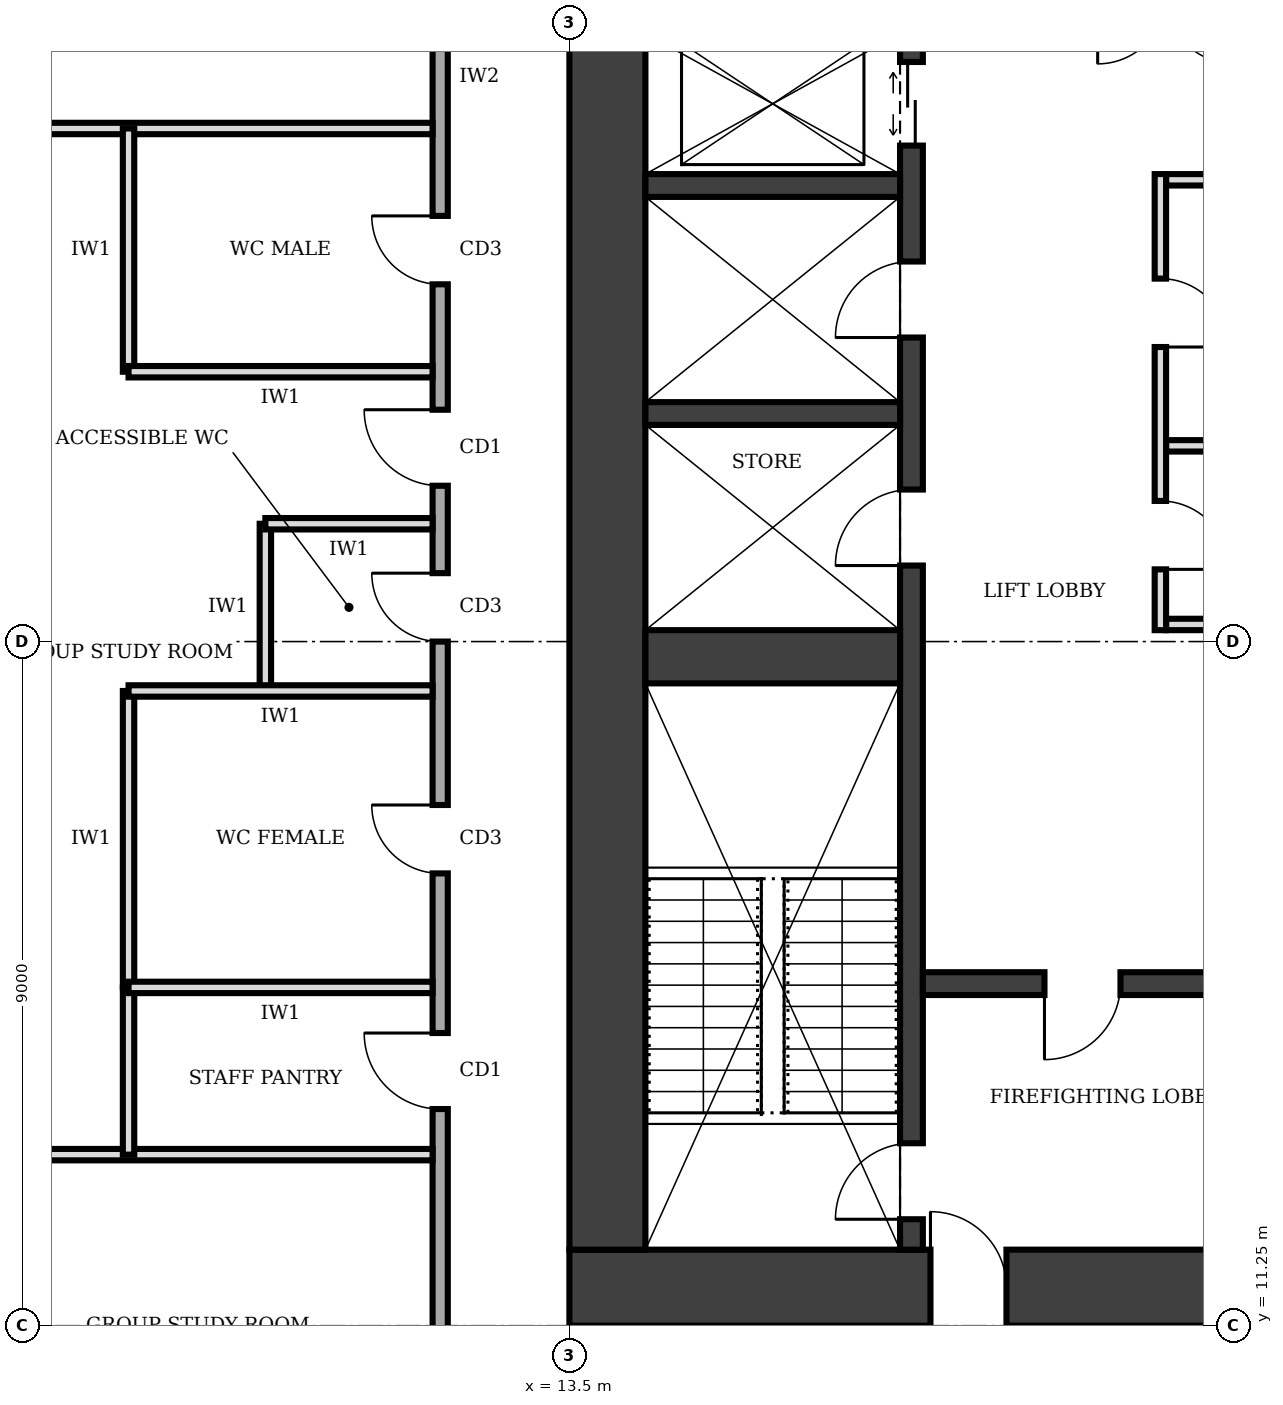
"""IFC4 building model, lengths in metres.
Left out: names, types, materials, properties, quantities, classifications, styles, units other than length and angle.
Written with IfcOpenShell. Run it as: python <this file> out.ifc"""

import sys

from ifc_helpers import new_model, si_unit, direction, frame, frame_2d, origin, place, context, subcontext, project, spatial, rectangle, extrude, element, fill, save


model = new_model("IFC4")
c1 = context("Model", 3, precision=1e-05, world=origin(), true_north=direction((0.0, 1.0)))
c2 = subcontext(c1, "Body", "Model", "MODEL_VIEW")
j1 = project(units=[si_unit("LENGTHUNIT", "METRE"), si_unit("PLANEANGLEUNIT", "RADIAN")], contexts=[c1])
p1 = place(None, origin())
s1 = spatial("IfcSite", under=j1, at=p1, CompositionType="ELEMENT")
p2 = place(p1, origin())
s2 = spatial("IfcBuilding", under=s1, at=p2, CompositionType="ELEMENT")
p3 = place(p2, frame((0.0, 0.0, 197.0)))
s3 = spatial("IfcBuildingStorey", under=s2, at=p3, CompositionType="ELEMENT", Elevation=197.0)
p4 = place(p3, frame((13.5, 11.75, 0.0), z_axis=(0.0, 0.0, 1.0), x_axis=(1.0, 0.0, 0.0)))
e1 = element("IfcWall", 1, at=p4, inside=s3, PredefinedType="SHEAR", context=c2, shape_type="SweptSolid", body=[
    extrude(rectangle(XDim=13.5, YDim=1.0, at=frame_2d((6.75, 0.0))), origin(), (0.0, 0.0, 1.0), 4.0),
])
p5 = place(p4, frame((4.75, 0.0, 0.0)))
e2 = element("IfcOpeningElement", 2, at=p5, cuts=e1, PredefinedType="OPENING", context=c2, shape_type="SweptSolid", body=[
    extrude(rectangle(XDim=1.0, YDim=2.1, at=frame_2d((0.5, 1.05))), frame((0.0, 0.51, 0.0), z_axis=(0.0, -1.0, 0.0), x_axis=(1.0, 0.0, 0.0)), (0.0, 0.0, 1.0), 1.02),
])
p6 = place(p3, frame((14.0, 28.25, 0.0), z_axis=(0.0, 0.0, 1.0), x_axis=(0.0, -1.0, 0.0)))
e3 = element("IfcWall", 3, at=p6, inside=s3, PredefinedType="SHEAR", context=c2, shape_type="SweptSolid", body=[
    extrude(rectangle(XDim=16.0, YDim=1.0, at=frame_2d((8.0, 0.0))), origin(), (0.0, 0.0, 1.0), 4.0),
])
p7 = place(p3, frame((18.0, 12.25, 0.0), z_axis=(0.0, 0.0, 1.0), x_axis=(0.0, 1.0, 0.0)))
e4 = element("IfcWall", 4, at=p7, inside=s3, PredefinedType="SHEAR", context=c2, shape_type="SweptSolid", body=[
    extrude(rectangle(XDim=16.0, YDim=0.3, at=frame_2d((8.0, 0.0))), origin(), (0.0, 0.0, 1.0), 4.0),
])
p8 = place(p7, frame((0.4, 0.0, 0.0)))
e5 = element("IfcOpeningElement", 5, at=p8, cuts=e4, PredefinedType="OPENING", context=c2, shape_type="SweptSolid", body=[
    extrude(rectangle(XDim=1.0, YDim=2.1, at=frame_2d((0.5, 1.05))), frame((0.0, 0.16, 0.0), z_axis=(0.0, -1.0, 0.0), x_axis=(1.0, 0.0, 0.0)), (0.0, 0.0, 1.0), 0.32),
])
p9 = place(p7, frame((14.525, 0.0, 0.0)))
e6 = element("IfcOpeningElement", 6, at=p9, cuts=e4, PredefinedType="OPENING", context=c2, shape_type="SweptSolid", body=[
    extrude(rectangle(XDim=1.1, YDim=2.1, at=frame_2d((0.55, 1.05))), frame((0.0, 0.16, 0.0), z_axis=(0.0, -1.0, 0.0), x_axis=(1.0, 0.0, 0.0)), (0.0, 0.0, 1.0), 0.32),
])
p10 = place(p7, frame((9.0, 0.0, 0.0)))
e7 = element("IfcOpeningElement", 7, at=p10, cuts=e4, PredefinedType="OPENING", context=c2, shape_type="SweptSolid", body=[
    extrude(rectangle(XDim=1.0, YDim=2.1, at=frame_2d((0.5, 1.05))), frame((0.0, 0.16, 0.0), z_axis=(0.0, -1.0, 0.0), x_axis=(1.0, 0.0, 0.0)), (0.0, 0.0, 1.0), 0.32),
])
p11 = place(p7, frame((12.0, 0.0, 0.0)))
e8 = element("IfcOpeningElement", 8, at=p11, cuts=e4, PredefinedType="OPENING", context=c2, shape_type="SweptSolid", body=[
    extrude(rectangle(XDim=1.0, YDim=2.1, at=frame_2d((0.5, 1.05))), frame((0.0, 0.16, 0.0), z_axis=(0.0, -1.0, 0.0), x_axis=(1.0, 0.0, 0.0)), (0.0, 0.0, 1.0), 0.32),
])
p12 = place(p3, frame((14.5, 20.05, 0.0), z_axis=(0.0, 0.0, 1.0), x_axis=(1.0, 0.0, 0.0)))
e9 = element("IfcWall", 9, at=p12, inside=s3, PredefinedType="SHEAR", context=c2, shape_type="SweptSolid", body=[
    extrude(rectangle(XDim=3.35, YDim=0.7, at=frame_2d((1.675, 0.0))), origin(), (0.0, 0.0, 1.0), 4.0),
])
p13 = place(p3, frame((18.15, 15.75, 0.0), z_axis=(0.0, 0.0, 1.0), x_axis=(1.0, 0.0, 0.0)))
e10 = element("IfcWall", 10, at=p13, inside=s3, PredefinedType="SHEAR", context=c2, shape_type="SweptSolid", body=[
    extrude(rectangle(XDim=4.2, YDim=0.3, at=frame_2d((2.1, 0.0))), origin(), (0.0, 0.0, 1.0), 4.0),
])
p14 = place(p13, frame((1.6, 0.0, 0.0)))
e11 = element("IfcOpeningElement", 11, at=p14, cuts=e10, PredefinedType="OPENING", context=c2, shape_type="SweptSolid", body=[
    extrude(rectangle(XDim=1.0, YDim=2.1, at=frame_2d((0.5, 1.05))), frame((0.0, 0.16, 0.0), z_axis=(0.0, -1.0, 0.0), x_axis=(1.0, 0.0, 0.0)), (0.0, 0.0, 1.0), 0.32),
])
for number, where, z_axis, x_axis in (
    (12, (14.5, 23.25, 0.0), (0.0, 0.0, 1.0), (1.0, 0.0, 0.0)),
    (13, (14.5, 26.25, 0.0), (0.0, 0.0, 1.0), (1.0, 0.0, 0.0)),
):
    element("IfcWall", number, at=place(p3, frame(where, z_axis=z_axis, x_axis=x_axis)), inside=s3, PredefinedType="SHEAR", context=c2, shape_type="SweptSolid", body=[
        extrude(rectangle(XDim=3.35, YDim=0.3, at=frame_2d((1.675, 0.0))), origin(), (0.0, 0.0, 1.0), 4.0),
    ])
p15 = place(p3, frame((21.275, 20.4, 0.0), z_axis=(0.0, 0.0, 1.0), x_axis=(0.0, 1.0, 0.0)))
e14 = element("IfcWall", 14, at=p15, inside=s3, PredefinedType="PARTITIONING", context=c2, shape_type="SweptSolid", body=[
    extrude(rectangle(XDim=6.0, YDim=0.15, at=frame_2d((3.0, 0.0))), origin(), (0.0, 0.0, 1.0), 3.75),
])
p16 = place(p15, frame((0.8, 0.0, 0.0)))
e15 = element("IfcOpeningElement", 15, at=p16, cuts=e14, PredefinedType="OPENING", context=c2, shape_type="SweptSolid", body=[
    extrude(rectangle(XDim=0.9, YDim=2.1, at=frame_2d((0.45, 1.05))), frame((0.0, 0.085, 0.0), z_axis=(0.0, -1.0, 0.0), x_axis=(1.0, 0.0, 0.0)), (0.0, 0.0, 1.0), 0.17),
])
p17 = place(p15, frame((3.725, 0.0, 0.0)))
e16 = element("IfcOpeningElement", 16, at=p17, cuts=e14, PredefinedType="OPENING", context=c2, shape_type="SweptSolid", body=[
    extrude(rectangle(XDim=0.9, YDim=2.1, at=frame_2d((0.45, 1.05))), frame((0.0, 0.085, 0.0), z_axis=(0.0, -1.0, 0.0), x_axis=(1.0, 0.0, 0.0)), (0.0, 0.0, 1.0), 0.17),
])
for number, where, z_axis, x_axis in (
    (17, (21.35, 20.475, 0.0), (0.0, 0.0, 1.0), (1.0, 0.0, 0.0)),
    (18, (21.35, 22.825, 0.0), (0.0, 0.0, 1.0), (1.0, 0.0, 0.0)),
    (19, (21.35, 26.325, 0.0), (0.0, 0.0, 1.0), (1.0, 0.0, 0.0)),
):
    element("IfcWall", number, at=place(p3, frame(where, z_axis=z_axis, x_axis=x_axis)), inside=s3, PredefinedType="PARTITIONING", context=c2, shape_type="SweptSolid", body=[
        extrude(rectangle(XDim=1.0, YDim=0.15, at=frame_2d((0.5, 0.0))), origin(), (0.0, 0.0, 1.0), 3.75),
    ])
p18 = place(p3, frame((11.8, 32.8, 0.0), z_axis=(0.0, 0.0, 1.0), x_axis=(0.0, -1.0, 0.0)))
e20 = element("IfcWall", 20, at=p18, inside=s3, PredefinedType="SOLIDWALL", context=c2, shape_type="SweptSolid", body=[
    extrude(rectangle(XDim=25.3, YDim=0.2, at=frame_2d((12.65, 0.0))), origin(), (0.0, 0.0, 1.0), 3.75),
])
p19 = place(p18, frame((21.8, 0.0, 0.0)))
e21 = element("IfcOpeningElement", 21, at=p19, cuts=e20, PredefinedType="OPENING", context=c2, shape_type="SweptSolid", body=[
    extrude(rectangle(XDim=1.0, YDim=2.1, at=frame_2d((0.5, 1.05))), frame((0.0, 0.11, 0.0), z_axis=(0.0, -1.0, 0.0), x_axis=(1.0, 0.0, 0.0)), (0.0, 0.0, 1.0), 0.22),
])
p20 = place(p18, frame((17.7, 0.0, 0.0)))
e22 = element("IfcOpeningElement", 22, at=p20, cuts=e20, PredefinedType="OPENING", context=c2, shape_type="SweptSolid", body=[
    extrude(rectangle(XDim=1.0, YDim=2.1, at=frame_2d((0.5, 1.05))), frame((0.0, 0.11, 0.0), z_axis=(0.0, -1.0, 0.0), x_axis=(1.0, 0.0, 0.0)), (0.0, 0.0, 1.0), 0.22),
])
p21 = place(p18, frame((14.7, 0.0, 0.0)))
e23 = element("IfcOpeningElement", 23, at=p21, cuts=e20, PredefinedType="OPENING", context=c2, shape_type="SweptSolid", body=[
    extrude(rectangle(XDim=0.9, YDim=2.1, at=frame_2d((0.45, 1.05))), frame((0.0, 0.11, 0.0), z_axis=(0.0, -1.0, 0.0), x_axis=(1.0, 0.0, 0.0)), (0.0, 0.0, 1.0), 0.22),
])
p22 = place(p18, frame((11.65, 0.0, 0.0)))
e24 = element("IfcOpeningElement", 24, at=p22, cuts=e20, PredefinedType="OPENING", context=c2, shape_type="SweptSolid", body=[
    extrude(rectangle(XDim=0.9, YDim=2.1, at=frame_2d((0.45, 1.05))), frame((0.0, 0.11, 0.0), z_axis=(0.0, -1.0, 0.0), x_axis=(1.0, 0.0, 0.0)), (0.0, 0.0, 1.0), 0.22),
])
p23 = place(p18, frame((6.95, 0.0, 0.0)))
e25 = element("IfcOpeningElement", 25, at=p23, cuts=e20, PredefinedType="OPENING", context=c2, shape_type="SweptSolid", body=[
    extrude(rectangle(XDim=0.9, YDim=2.1, at=frame_2d((0.45, 1.05))), frame((0.0, 0.11, 0.0), z_axis=(0.0, -1.0, 0.0), x_axis=(1.0, 0.0, 0.0)), (0.0, 0.0, 1.0), 0.22),
])
p24 = place(p18, frame((9.5, 0.0, 0.0)))
e26 = element("IfcOpeningElement", 26, at=p24, cuts=e20, PredefinedType="OPENING", context=c2, shape_type="SweptSolid", body=[
    extrude(rectangle(XDim=1.0, YDim=2.1, at=frame_2d((0.5, 1.05))), frame((0.0, 0.11, 0.0), z_axis=(0.0, -1.0, 0.0), x_axis=(1.0, 0.0, 0.0)), (0.0, 0.0, 1.0), 0.22),
])
p25 = place(p18, frame((2.3, 0.0, 0.0)))
e27 = element("IfcOpeningElement", 27, at=p25, cuts=e20, PredefinedType="OPENING", context=c2, shape_type="SweptSolid", body=[
    extrude(rectangle(XDim=1.0, YDim=2.1, at=frame_2d((0.5, 1.05))), frame((0.0, 0.11, 0.0), z_axis=(0.0, -1.0, 0.0), x_axis=(1.0, 0.0, 0.0)), (0.0, 0.0, 1.0), 0.22),
])
for number, where, z_axis, x_axis in (
    (28, (0.3, 13.5, 0.0), (0.0, 0.0, 1.0), (1.0, 0.0, 0.0)),
    (29, (0.3, 27.0, 0.0), (0.0, 0.0, 1.0), (1.0, 0.0, 0.0)),
):
    element("IfcWall", number, at=place(p3, frame(where, z_axis=z_axis, x_axis=x_axis)), inside=s3, PredefinedType="PARTITIONING", context=c2, shape_type="SweptSolid", body=[
        extrude(rectangle(XDim=11.4, YDim=0.15, at=frame_2d((5.7, 0.0))), origin(), (0.0, 0.0, 1.0), 3.75),
    ])
p26 = place(p3, frame((11.7, 15.7, 0.0), z_axis=(0.0, 0.0, 1.0), x_axis=(-1.0, 0.0, 0.0)))
e30 = element("IfcWall", 30, at=p26, inside=s3, PredefinedType="PARTITIONING", context=c2, shape_type="SweptSolid", body=[
    extrude(rectangle(XDim=4.0, YDim=0.15, at=frame_2d((2.0, 0.0))), origin(), (0.0, 0.0, 1.0), 3.75),
])
p27 = place(p3, frame((11.7, 19.6, 0.0), z_axis=(0.0, 0.0, 1.0), x_axis=(-1.0, 0.0, 0.0)))
e31 = element("IfcWall", 31, at=p27, inside=s3, PredefinedType="PARTITIONING", context=c2, shape_type="SweptSolid", body=[
    extrude(rectangle(XDim=4.0, YDim=0.15, at=frame_2d((2.0, 0.0))), origin(), (0.0, 0.0, 1.0), 2.85),
])
p28 = place(p3, frame((11.7, 21.8, 0.0), z_axis=(0.0, 0.0, 1.0), x_axis=(-1.0, 0.0, 0.0)))
e32 = element("IfcWall", 32, at=p28, inside=s3, PredefinedType="PARTITIONING", context=c2, shape_type="SweptSolid", body=[
    extrude(rectangle(XDim=2.2, YDim=0.15, at=frame_2d((1.1, 0.0))), origin(), (0.0, 0.0, 1.0), 3.75),
])
p29 = place(p3, frame((11.7, 23.8, 0.0), z_axis=(0.0, 0.0, 1.0), x_axis=(-1.0, 0.0, 0.0)))
e33 = element("IfcWall", 33, at=p29, inside=s3, PredefinedType="PARTITIONING", context=c2, shape_type="SweptSolid", body=[
    extrude(rectangle(XDim=4.0, YDim=0.15, at=frame_2d((2.0, 0.0))), origin(), (0.0, 0.0, 1.0), 3.75),
])
p30 = place(p3, frame((7.7, 13.5, 0.0), z_axis=(0.0, 0.0, 1.0), x_axis=(0.0, 1.0, 0.0)))
e34 = element("IfcWall", 34, at=p30, inside=s3, PredefinedType="PARTITIONING", context=c2, shape_type="SweptSolid", body=[
    extrude(rectangle(XDim=2.2, YDim=0.15, at=frame_2d((1.1, 0.0))), origin(), (0.0, 0.0, 1.0), 3.75),
])
p31 = place(p3, frame((7.7, 15.7, 0.0), z_axis=(0.0, 0.0, 1.0), x_axis=(0.0, 1.0, 0.0)))
e35 = element("IfcWall", 35, at=p31, inside=s3, PredefinedType="PARTITIONING", context=c2, shape_type="SweptSolid", body=[
    extrude(rectangle(XDim=3.9, YDim=0.15, at=frame_2d((1.95, 0.0))), origin(), (0.0, 0.0, 1.0), 3.75),
])
p32 = place(p3, frame((9.5, 19.6, 0.0), z_axis=(0.0, 0.0, 1.0), x_axis=(0.0, 1.0, 0.0)))
e36 = element("IfcWall", 36, at=p32, inside=s3, PredefinedType="PARTITIONING", context=c2, shape_type="SweptSolid", body=[
    extrude(rectangle(XDim=2.2, YDim=0.15, at=frame_2d((1.1, 0.0))), origin(), (0.0, 0.0, 1.0), 3.75),
])
p33 = place(p3, frame((7.7, 23.8, 0.0), z_axis=(0.0, 0.0, 1.0), x_axis=(0.0, 1.0, 0.0)))
e37 = element("IfcWall", 37, at=p33, inside=s3, PredefinedType="PARTITIONING", context=c2, shape_type="SweptSolid", body=[
    extrude(rectangle(XDim=3.2, YDim=0.15, at=frame_2d((1.6, 0.0))), origin(), (0.0, 0.0, 1.0), 3.75),
])
p34 = place(p5, origin())
e38 = element("IfcDoor", 38, at=p34, inside=s3, OperationType="SINGLE_SWING_LEFT", PredefinedType="DOOR", context=c2, shape_type="SweptSolid", body=[
    extrude(rectangle(XDim=1.0, YDim=2.1, at=frame_2d((0.5, 1.05))), frame((0.0, 0.025, 0.0), z_axis=(0.0, -1.0, 0.0), x_axis=(1.0, 0.0, 0.0)), (0.0, 0.0, 1.0), 0.05),
])
fill(e2, e38)
p35 = place(p14, frame((1.0, 0.0, 0.0), z_axis=(0.0, 0.0, 1.0), x_axis=(-1.0, 0.0, 0.0)))
e39 = element("IfcDoor", 39, at=p35, inside=s3, OperationType="SINGLE_SWING_RIGHT", PredefinedType="DOOR", context=c2, shape_type="SweptSolid", body=[
    extrude(rectangle(XDim=1.0, YDim=2.1, at=frame_2d((0.5, 1.05))), frame((0.0, 0.025, 0.0), z_axis=(0.0, -1.0, 0.0), x_axis=(1.0, 0.0, 0.0)), (0.0, 0.0, 1.0), 0.05),
])
fill(e11, e39)
p36 = place(p8, origin())
e40 = element("IfcDoor", 40, at=p36, inside=s3, OperationType="SINGLE_SWING_LEFT", PredefinedType="DOOR", context=c2, shape_type="SweptSolid", body=[
    extrude(rectangle(XDim=1.0, YDim=2.1, at=frame_2d((0.5, 1.05))), frame((0.0, 0.025, 0.0), z_axis=(0.0, -1.0, 0.0), x_axis=(1.0, 0.0, 0.0)), (0.0, 0.0, 1.0), 0.05),
])
fill(e5, e40)
p37 = place(p9, origin())
e41 = element("IfcDoor", 41, at=p37, inside=s3, OperationType="DOUBLE_DOOR_SLIDING", PredefinedType="DOOR", context=c2, shape_type="SweptSolid", body=[
    extrude(rectangle(XDim=1.1, YDim=2.1, at=frame_2d((0.55, 1.05))), frame((0.0, 0.025, 0.0), z_axis=(0.0, -1.0, 0.0), x_axis=(1.0, 0.0, 0.0)), (0.0, 0.0, 1.0), 0.05),
])
fill(e6, e41)
p38 = place(p16, frame((0.9, 0.0, 0.0), z_axis=(0.0, 0.0, 1.0), x_axis=(-1.0, 0.0, 0.0)))
e42 = element("IfcDoor", 42, at=p38, inside=s3, OperationType="SINGLE_SWING_RIGHT", PredefinedType="DOOR", context=c2, shape_type="SweptSolid", body=[
    extrude(rectangle(XDim=0.9, YDim=2.1, at=frame_2d((0.45, 1.05))), frame((0.0, 0.025, 0.0), z_axis=(0.0, -1.0, 0.0), x_axis=(1.0, 0.0, 0.0)), (0.0, 0.0, 1.0), 0.05),
])
fill(e15, e42)
p39 = place(p17, frame((0.9, 0.0, 0.0), z_axis=(0.0, 0.0, 1.0), x_axis=(-1.0, 0.0, 0.0)))
e43 = element("IfcDoor", 43, at=p39, inside=s3, OperationType="SINGLE_SWING_RIGHT", PredefinedType="DOOR", context=c2, shape_type="SweptSolid", body=[
    extrude(rectangle(XDim=0.9, YDim=2.1, at=frame_2d((0.45, 1.05))), frame((0.0, 0.025, 0.0), z_axis=(0.0, -1.0, 0.0), x_axis=(1.0, 0.0, 0.0)), (0.0, 0.0, 1.0), 0.05),
])
fill(e16, e43)
p40 = place(p10, origin())
e44 = element("IfcDoor", 44, at=p40, inside=s3, OperationType="SINGLE_SWING_LEFT", PredefinedType="DOOR", context=c2, shape_type="SweptSolid", body=[
    extrude(rectangle(XDim=1.0, YDim=2.1, at=frame_2d((0.5, 1.05))), frame((0.0, 0.025, 0.0), z_axis=(0.0, -1.0, 0.0), x_axis=(1.0, 0.0, 0.0)), (0.0, 0.0, 1.0), 0.05),
])
fill(e7, e44)
p41 = place(p11, origin())
e45 = element("IfcDoor", 45, at=p41, inside=s3, OperationType="SINGLE_SWING_LEFT", PredefinedType="DOOR", context=c2, shape_type="SweptSolid", body=[
    extrude(rectangle(XDim=1.0, YDim=2.1, at=frame_2d((0.5, 1.05))), frame((0.0, 0.025, 0.0), z_axis=(0.0, -1.0, 0.0), x_axis=(1.0, 0.0, 0.0)), (0.0, 0.0, 1.0), 0.05),
])
fill(e8, e45)
p42 = place(p20, frame((1.0, 0.0, 0.0), z_axis=(0.0, 0.0, 1.0), x_axis=(-1.0, 0.0, 0.0)))
e46 = element("IfcDoor", 46, at=p42, inside=s3, OperationType="SINGLE_SWING_RIGHT", PredefinedType="DOOR", context=c2, shape_type="SweptSolid", body=[
    extrude(rectangle(XDim=1.0, YDim=2.1, at=frame_2d((0.5, 1.05))), frame((0.0, 0.025, 0.0), z_axis=(0.0, -1.0, 0.0), x_axis=(1.0, 0.0, 0.0)), (0.0, 0.0, 1.0), 0.05),
])
fill(e22, e46)
p43 = place(p21, frame((0.9, 0.0, 0.0), z_axis=(0.0, 0.0, 1.0), x_axis=(-1.0, 0.0, 0.0)))
e47 = element("IfcDoor", 47, at=p43, inside=s3, OperationType="SINGLE_SWING_RIGHT", PredefinedType="DOOR", context=c2, shape_type="SweptSolid", body=[
    extrude(rectangle(XDim=0.9, YDim=2.1, at=frame_2d((0.45, 1.05))), frame((0.0, 0.025, 0.0), z_axis=(0.0, -1.0, 0.0), x_axis=(1.0, 0.0, 0.0)), (0.0, 0.0, 1.0), 0.05),
])
fill(e23, e47)
p44 = place(p22, frame((0.9, 0.0, 0.0), z_axis=(0.0, 0.0, 1.0), x_axis=(-1.0, 0.0, 0.0)))
e48 = element("IfcDoor", 48, at=p44, inside=s3, OperationType="SINGLE_SWING_RIGHT", PredefinedType="DOOR", context=c2, shape_type="SweptSolid", body=[
    extrude(rectangle(XDim=0.9, YDim=2.1, at=frame_2d((0.45, 1.05))), frame((0.0, 0.025, 0.0), z_axis=(0.0, -1.0, 0.0), x_axis=(1.0, 0.0, 0.0)), (0.0, 0.0, 1.0), 0.05),
])
fill(e24, e48)
p45 = place(p23, frame((0.9, 0.0, 0.0), z_axis=(0.0, 0.0, 1.0), x_axis=(-1.0, 0.0, 0.0)))
e49 = element("IfcDoor", 49, at=p45, inside=s3, OperationType="SINGLE_SWING_RIGHT", PredefinedType="DOOR", context=c2, shape_type="SweptSolid", body=[
    extrude(rectangle(XDim=0.9, YDim=2.1, at=frame_2d((0.45, 1.05))), frame((0.0, 0.025, 0.0), z_axis=(0.0, -1.0, 0.0), x_axis=(1.0, 0.0, 0.0)), (0.0, 0.0, 1.0), 0.05),
])
fill(e25, e49)
p46 = place(p24, frame((1.0, 0.0, 0.0), z_axis=(0.0, 0.0, 1.0), x_axis=(-1.0, 0.0, 0.0)))
e50 = element("IfcDoor", 50, at=p46, inside=s3, OperationType="SINGLE_SWING_RIGHT", PredefinedType="DOOR", context=c2, shape_type="SweptSolid", body=[
    extrude(rectangle(XDim=1.0, YDim=2.1, at=frame_2d((0.5, 1.05))), frame((0.0, 0.025, 0.0), z_axis=(0.0, -1.0, 0.0), x_axis=(1.0, 0.0, 0.0)), (0.0, 0.0, 1.0), 0.05),
])
fill(e26, e50)
save(model, sys.argv[1])
